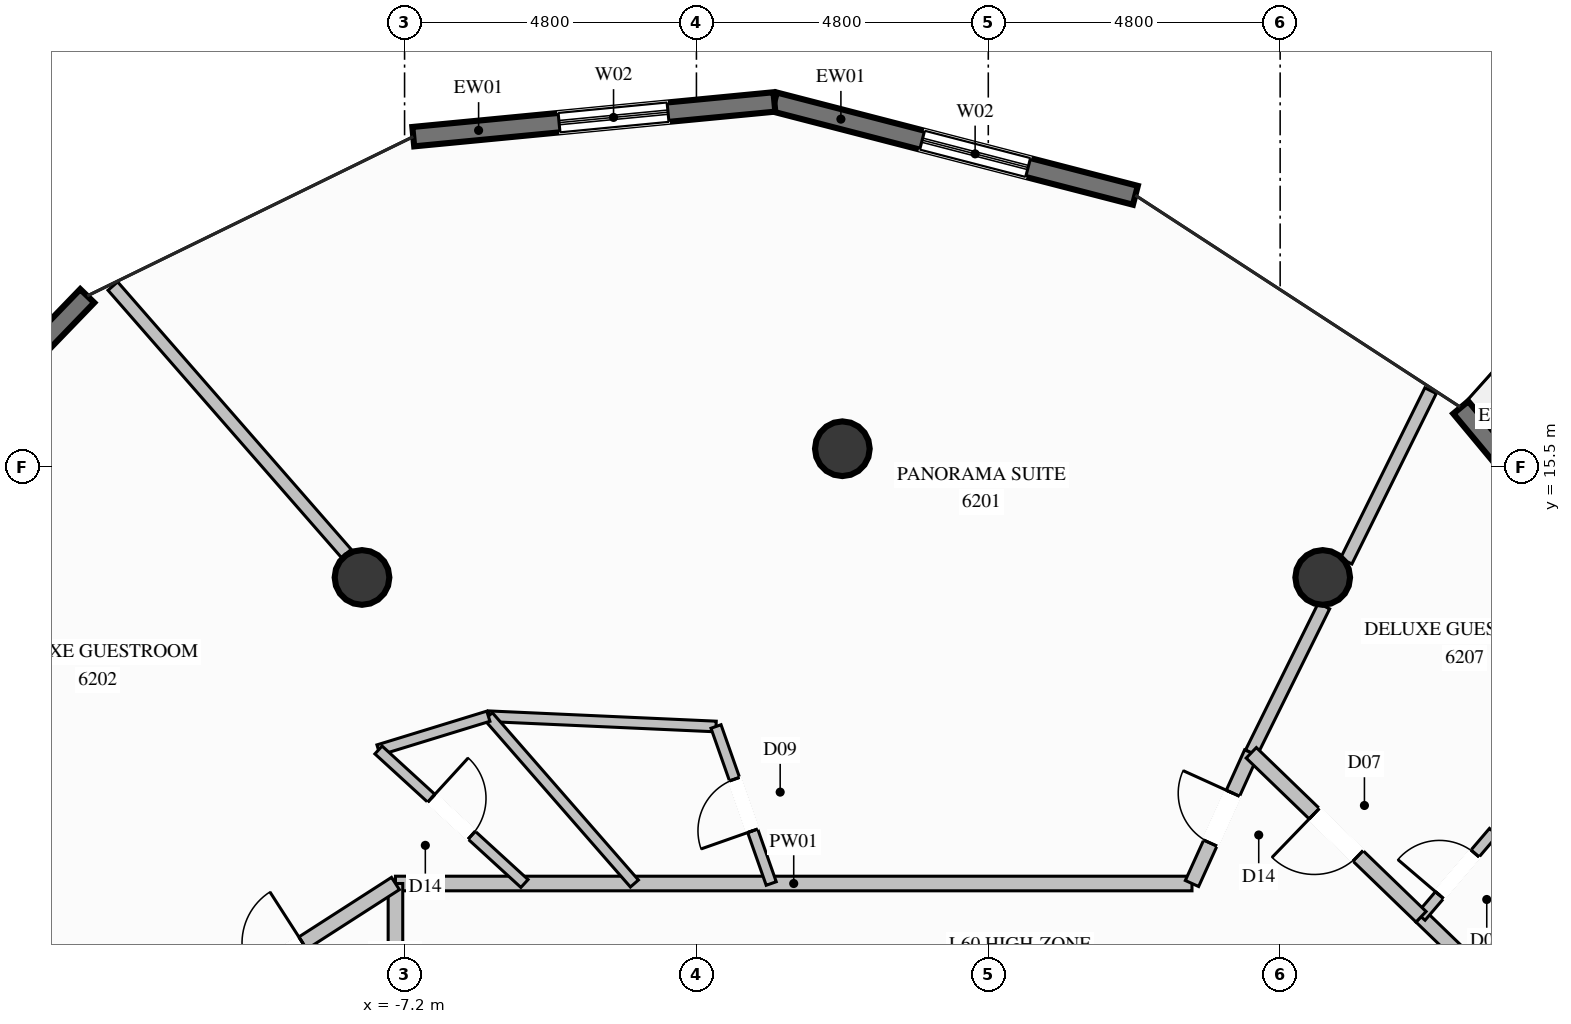
"""IFC4 building model, lengths in metres.
Left out: names, types, materials, properties, quantities, classifications, styles, units other than length and angle.
Written with IfcOpenShell. Run it as: python <this file> out.ifc"""

import sys

from ifc_helpers import new_model, si_unit, direction, frame, frame_2d, origin, origin_2d, place, context, subcontext, project, spatial, rectangle, circle, extrude, element, fill, save


model = new_model("IFC4")
c1 = context("Model", 3, precision=1e-05, world=origin(), true_north=direction((0.0, 1.0)))
c2 = subcontext(c1, "Body", "Model", "MODEL_VIEW")
j1 = project(units=[si_unit("LENGTHUNIT", "METRE"), si_unit("PLANEANGLEUNIT", "RADIAN")], contexts=[c1])
p1 = place(None, origin())
s1 = spatial("IfcSite", under=j1, at=p1, CompositionType="ELEMENT")
p2 = place(p1, origin())
s2 = spatial("IfcBuilding", under=s1, at=p2, CompositionType="ELEMENT")
p3 = place(p2, frame((0.0, 0.0, 230.8)))
s3 = spatial("IfcBuildingStorey", under=s2, at=p3, CompositionType="ELEMENT", Elevation=230.8)
for number, where, z_axis, x_axis in (
    (1, (7.9, 13.683, 0.0), (0.0, 0.0, 1.0), (1.0, 0.0, 0.0)),
    (2, (0.0, 15.8, 0.0), (0.0, 0.0, 1.0), (1.0, 0.0, 0.0)),
    (3, (-7.9, 13.683, 0.0), (0.0, 0.0, 1.0), (1.0, 0.0, 0.0)),
):
    element("IfcColumn", number, at=place(p3, frame(where, z_axis=z_axis, x_axis=x_axis)), inside=s3, PredefinedType="COLUMN", context=c2, shape_type="SweptSolid", body=[
        extrude(circle(Radius=0.45, at=origin_2d()), origin(), (0.0, 0.0, 1.0), 3.6),
    ])
p4 = place(p3, frame((10.171, 16.479, 0.0), z_axis=(0.0, 0.0, 1.0), x_axis=(0.639438786748, -0.76884201108, 0.0)))
e4 = element("IfcWall", 4, at=p4, inside=s3, PredefinedType="SOLIDWALL", context=c2, shape_type="SweptSolid", body=[
    extrude(rectangle(XDim=6.637, YDim=0.32, at=frame_2d((3.319, 0.0))), origin(), (0.0, 0.0, 1.0), 3.2),
])
p5 = place(p4, frame((2.419, 0.0, 0.35)))
e5 = element("IfcOpeningElement", 5, at=p5, cuts=e4, PredefinedType="OPENING", context=c2, shape_type="SweptSolid", body=[
    extrude(rectangle(XDim=1.8, YDim=2.6, at=frame_2d((0.9, 1.3))), frame((0.0, 0.17, 0.0), z_axis=(0.0, -1.0, 0.0), x_axis=(1.0, 0.0, 0.0)), (0.0, 0.0, 1.0), 0.34),
])
p6 = place(p3, frame((-1.118, 21.503, 0.0), z_axis=(0.0, 0.0, 1.0), x_axis=(0.968167541314, -0.250303040227, 0.0)))
e6 = element("IfcWall", 6, at=p6, inside=s3, PredefinedType="SOLIDWALL", context=c2, shape_type="SweptSolid", body=[
    extrude(rectangle(XDim=6.132, YDim=0.32, at=frame_2d((3.066, 0.0))), origin(), (0.0, 0.0, 1.0), 3.2),
])
p7 = place(p6, frame((2.51, 0.0, 0.35)))
e7 = element("IfcOpeningElement", 7, at=p7, cuts=e6, PredefinedType="OPENING", context=c2, shape_type="SweptSolid", body=[
    extrude(rectangle(XDim=1.8, YDim=2.6, at=frame_2d((0.9, 1.3))), frame((0.0, 0.17, 0.0), z_axis=(0.0, -1.0, 0.0), x_axis=(1.0, 0.0, 0.0)), (0.0, 0.0, 1.0), 0.34),
])
p8 = place(p3, frame((-7.057, 20.932, 0.0), z_axis=(0.0, 0.0, 1.0), x_axis=(0.995409179042, 0.095710847233, 0.0)))
e8 = element("IfcWall", 8, at=p8, inside=s3, PredefinedType="SOLIDWALL", context=c2, shape_type="SweptSolid", body=[
    extrude(rectangle(XDim=5.966, YDim=0.32, at=frame_2d((2.983, 0.0))), origin(), (0.0, 0.0, 1.0), 3.2),
])
p9 = place(p8, frame((2.409, 0.0, 0.35)))
e9 = element("IfcOpeningElement", 9, at=p9, cuts=e8, PredefinedType="OPENING", context=c2, shape_type="SweptSolid", body=[
    extrude(rectangle(XDim=1.8, YDim=2.6, at=frame_2d((0.9, 1.3))), frame((0.0, 0.17, 0.0), z_axis=(0.0, -1.0, 0.0), x_axis=(1.0, 0.0, 0.0)), (0.0, 0.0, 1.0), 0.34),
])
p10 = place(p3, frame((-16.677, 13.901, 0.0), z_axis=(0.0, 0.0, 1.0), x_axis=(0.694433198018, 0.71955717875, 0.0)))
e10 = element("IfcWall", 10, at=p10, inside=s3, PredefinedType="SOLIDWALL", context=c2, shape_type="SweptSolid", body=[
    extrude(rectangle(XDim=6.132, YDim=0.32, at=frame_2d((3.066, 0.0))), origin(), (0.0, 0.0, 1.0), 3.2),
])
p11 = place(p10, frame((2.166, 0.0, 0.35)))
e11 = element("IfcOpeningElement", 11, at=p11, cuts=e10, PredefinedType="OPENING", context=c2, shape_type="SweptSolid", body=[
    extrude(rectangle(XDim=1.8, YDim=2.6, at=frame_2d((0.9, 1.3))), frame((0.0, 0.17, 0.0), z_axis=(0.0, -1.0, 0.0), x_axis=(1.0, 0.0, 0.0)), (0.0, 0.0, 1.0), 0.34),
])
p12 = place(p3, frame((-7.35, 8.65, 0.0), z_axis=(0.0, 0.0, 1.0), x_axis=(1.0, 0.0, 0.0)))
e12 = element("IfcWall", 12, at=p12, inside=s3, PredefinedType="PARTITIONING", context=c2, shape_type="SweptSolid", body=[
    extrude(rectangle(XDim=13.1, YDim=0.24, at=frame_2d((6.55, 0.0))), origin(), (0.0, 0.0, 1.0), 3.2),
])
p13 = place(p3, frame((-7.35, 4.95, 0.0), z_axis=(0.0, 0.0, 1.0), x_axis=(0.0, 1.0, 0.0)))
e13 = element("IfcWall", 13, at=p13, inside=s3, PredefinedType="PARTITIONING", context=c2, shape_type="SweptSolid", body=[
    extrude(rectangle(XDim=3.7, YDim=0.24, at=frame_2d((1.85, 0.0))), origin(), (0.0, 0.0, 1.0), 3.2),
])
p14 = place(p3, frame((6.725, 10.799, 0.0), z_axis=(0.0, 0.0, 1.0), x_axis=(0.443620421332, 0.896214774358, 0.0)))
e14 = element("IfcWall", 14, at=p14, inside=s3, PredefinedType="PARTITIONING", context=c2, shape_type="SweptSolid", body=[
    extrude(rectangle(XDim=2.693, YDim=0.21, at=frame_2d((1.347, 0.0))), origin(), (0.0, 0.0, 1.0), 2.067),
])
p15 = place(p3, frame((8.286, 13.951, 0.0), z_axis=(0.0, 0.0, 1.0), x_axis=(0.443683126351, 0.896183733054, 0.0)))
e15 = element("IfcWall", 15, at=p15, inside=s3, PredefinedType="PARTITIONING", context=c2, shape_type="SweptSolid", body=[
    extrude(rectangle(XDim=3.129, YDim=0.21, at=frame_2d((1.564, 0.0))), origin(), (0.0, 0.0, 1.0), 3.2),
])
p16 = place(p3, frame((-5.822, 11.401, 0.0), z_axis=(0.0, 0.0, 1.0), x_axis=(0.99898352798, -0.045076721529, 0.0)))
e16 = element("IfcWall", 16, at=p16, inside=s3, PredefinedType="PLUMBINGWALL", context=c2, shape_type="SweptSolid", body=[
    extrude(rectangle(XDim=3.748, YDim=0.175, at=frame_2d((1.874, 0.0))), origin(), (0.0, 0.0, 1.0), 3.2),
])
p17 = place(p3, frame((-5.822, 11.401, 0.0), z_axis=(0.0, 0.0, 1.0), x_axis=(0.657728098428, -0.753255433793, 0.0)))
e17 = element("IfcWall", 17, at=p17, inside=s3, PredefinedType="PLUMBINGWALL", context=c2, shape_type="SweptSolid", body=[
    extrude(rectangle(XDim=3.652, YDim=0.175, at=frame_2d((1.826, 0.0))), origin(), (0.0, 0.0, 1.0), 2.067),
])
p18 = place(p3, frame((-1.17, 8.65, 0.0), z_axis=(0.0, 0.0, 1.0), x_axis=(-0.33173276109, 0.943373401798, 0.0)))
e18 = element("IfcWall", 18, at=p18, inside=s3, PredefinedType="PLUMBINGWALL", context=c2, shape_type="SweptSolid", body=[
    extrude(rectangle(XDim=2.737, YDim=0.175, at=frame_2d((1.369, 0.0))), origin(), (0.0, 0.0, 1.0), 3.2),
])
p19 = place(p18, frame((0.919, 0.0, 0.0)))
e19 = element("IfcOpeningElement", 19, at=p19, cuts=e18, PredefinedType="OPENING", context=c2, shape_type="SweptSolid", body=[
    extrude(rectangle(XDim=0.9, YDim=2.1, at=frame_2d((0.45, 1.05))), frame((0.0, 0.098, 0.0), z_axis=(0.0, -1.0, 0.0), x_axis=(1.0, 0.0, 0.0)), (0.0, 0.0, 1.0), 0.195),
])
p20 = place(p3, frame((-8.157, 14.076, 0.0), z_axis=(0.0, 0.0, 1.0), x_axis=(-0.657708106677, 0.753272889736, 0.0)))
e20 = element("IfcWall", 20, at=p20, inside=s3, PredefinedType="PARTITIONING", context=c2, shape_type="SweptSolid", body=[
    extrude(rectangle(XDim=5.84, YDim=0.21, at=frame_2d((2.92, 0.0))), origin(), (0.0, 0.0, 1.0), 3.2),
])
p21 = place(p3, frame((5.75, 8.65, 0.0), z_axis=(0.0, 0.0, 1.0), x_axis=(0.413171528251, 0.910653220629, 0.0)))
e21 = element("IfcWall", 21, at=p21, inside=s3, PredefinedType="PARTITIONING", context=c2, shape_type="SweptSolid", body=[
    extrude(rectangle(XDim=2.36, YDim=0.24, at=frame_2d((1.18, 0.0))), origin(), (0.0, 0.0, 1.0), 2.067),
])
p22 = place(p21, frame((0.73, 0.0, 0.0)))
e22 = element("IfcOpeningElement", 22, at=p22, cuts=e21, PredefinedType="OPENING", context=c2, shape_type="SweptSolid", body=[
    extrude(rectangle(XDim=0.9, YDim=2.02, at=frame_2d((0.45, 1.01))), frame((0.0, 0.13, 0.0), z_axis=(0.0, -1.0, 0.0), x_axis=(1.0, 0.0, 0.0)), (0.0, 0.0, 1.0), 0.26),
])
p23 = place(p3, frame((-7.629, 10.846, 0.0), z_axis=(0.0, 0.0, 1.0), x_axis=(0.955932477138, 0.293586612692, 0.0)))
e23 = element("IfcWall", 23, at=p23, inside=s3, PredefinedType="PLUMBINGWALL", context=c2, shape_type="SweptSolid", body=[
    extrude(rectangle(XDim=1.89, YDim=0.175, at=frame_2d((0.945, 0.0))), origin(), (0.0, 0.0, 1.0), 3.2),
])
p24 = place(p3, frame((-7.629, 10.846, 0.0), z_axis=(0.0, 0.0, 1.0), x_axis=(0.737882530439, -0.674929160189, 0.0)))
e24 = element("IfcWall", 24, at=p24, inside=s3, PredefinedType="PLUMBINGWALL", context=c2, shape_type="SweptSolid", body=[
    extrude(rectangle(XDim=3.254, YDim=0.175, at=frame_2d((1.627, 0.0))), origin(), (0.0, 0.0, 1.0), 2.067),
])
p25 = place(p24, frame((1.177, 0.0, 0.0)))
e25 = element("IfcOpeningElement", 25, at=p25, cuts=e24, PredefinedType="OPENING", context=c2, shape_type="SweptSolid", body=[
    extrude(rectangle(XDim=0.9, YDim=2.02, at=frame_2d((0.45, 1.01))), frame((0.0, 0.098, 0.0), z_axis=(0.0, -1.0, 0.0), x_axis=(1.0, 0.0, 0.0)), (0.0, 0.0, 1.0), 0.195),
])
p26 = place(p3, frame((-11.238, 6.15, 0.0), z_axis=(0.0, 0.0, 1.0), x_axis=(0.841118406986, 0.540851019625, 0.0)))
e26 = element("IfcWall", 26, at=p26, inside=s3, PredefinedType="PARTITIONING", context=c2, shape_type="SweptSolid", body=[
    extrude(rectangle(XDim=4.622, YDim=0.24, at=frame_2d((2.311, 0.0))), origin(), (0.0, 0.0, 1.0), 3.2),
])
p27 = place(p26, frame((1.811, 0.0, 0.0)))
e27 = element("IfcOpeningElement", 27, at=p27, cuts=e26, PredefinedType="OPENING", context=c2, shape_type="SweptSolid", body=[
    extrude(rectangle(XDim=1.0, YDim=2.2, at=frame_2d((0.5, 1.1))), frame((0.0, 0.13, 0.0), z_axis=(0.0, -1.0, 0.0), x_axis=(1.0, 0.0, 0.0)), (0.0, 0.0, 1.0), 0.26),
])
p28 = place(p3, frame((11.538, 6.15, 0.0), z_axis=(0.0, 0.0, 1.0), x_axis=(-0.719078080202, 0.694929287463, 0.0)))
e28 = element("IfcWall", 28, at=p28, inside=s3, PredefinedType="PARTITIONING", context=c2, shape_type="SweptSolid", body=[
    extrude(rectangle(XDim=2.811, YDim=0.24, at=frame_2d((1.405, 0.0))), origin(), (0.0, 0.0, 1.0), 3.2),
])
p29 = place(p3, frame((12.867, 7.091, 0.0), z_axis=(0.0, 0.0, 1.0), x_axis=(-0.667390556652, 0.744707892325, 0.0)))
e29 = element("IfcWall", 29, at=p29, inside=s3, PredefinedType="PLUMBINGWALL", context=c2, shape_type="SweptSolid", body=[
    extrude(rectangle(XDim=3.233, YDim=0.175, at=frame_2d((1.617, 0.0))), origin(), (0.0, 0.0, 1.0), 3.2),
])
p30 = place(p3, frame((9.517, 8.103, 0.0), z_axis=(0.0, 0.0, 1.0), x_axis=(0.649322426224, 0.760513239071, 0.0)))
e30 = element("IfcWall", 30, at=p30, inside=s3, PredefinedType="PLUMBINGWALL", context=c2, shape_type="SweptSolid", body=[
    extrude(rectangle(XDim=1.836, YDim=0.175, at=frame_2d((0.918, 0.0))), origin(), (0.0, 0.0, 1.0), 3.2),
])
p31 = place(p30, frame((0.468, 0.0, 0.0)))
e31 = element("IfcOpeningElement", 31, at=p31, cuts=e30, PredefinedType="OPENING", context=c2, shape_type="SweptSolid", body=[
    extrude(rectangle(XDim=0.9, YDim=2.1, at=frame_2d((0.45, 1.05))), frame((0.0, 0.098, 0.0), z_axis=(0.0, -1.0, 0.0), x_axis=(1.0, 0.0, 0.0)), (0.0, 0.0, 1.0), 0.195),
])
p32 = place(p3, frame((9.517, 8.103, 0.0), z_axis=(0.0, 0.0, 1.0), x_axis=(-0.719359188441, 0.694638292931, 0.0)))
e32 = element("IfcWall", 32, at=p32, inside=s3, PredefinedType="PARTITIONING", context=c2, shape_type="SweptSolid", body=[
    extrude(rectangle(XDim=3.881, YDim=0.24, at=frame_2d((1.94, 0.0))), origin(), (0.0, 0.0, 1.0), 3.2),
])
p33 = place(p32, frame((1.441, 0.0, 0.0)))
e33 = element("IfcOpeningElement", 33, at=p33, cuts=e32, PredefinedType="OPENING", context=c2, shape_type="SweptSolid", body=[
    extrude(rectangle(XDim=1.0, YDim=2.2, at=frame_2d((0.5, 1.1))), frame((0.0, 0.13, 0.0), z_axis=(0.0, -1.0, 0.0), x_axis=(1.0, 0.0, 0.0)), (0.0, 0.0, 1.0), 0.26),
])
p34 = place(p7, origin())
e34 = element("IfcWindow", 34, at=p34, inside=s3, PartitioningType="SINGLE_PANEL", PredefinedType="WINDOW", context=c2, shape_type="SweptSolid", body=[
    extrude(rectangle(XDim=1.8, YDim=2.6, at=frame_2d((0.9, 1.3))), frame((0.0, 0.03, 0.0), z_axis=(0.0, -1.0, 0.0), x_axis=(1.0, 0.0, 0.0)), (0.0, 0.0, 1.0), 0.06),
])
fill(e7, e34)
p35 = place(p9, origin())
e35 = element("IfcWindow", 35, at=p35, inside=s3, PartitioningType="SINGLE_PANEL", PredefinedType="WINDOW", context=c2, shape_type="SweptSolid", body=[
    extrude(rectangle(XDim=1.8, YDim=2.6, at=frame_2d((0.9, 1.3))), frame((0.0, 0.03, 0.0), z_axis=(0.0, -1.0, 0.0), x_axis=(1.0, 0.0, 0.0)), (0.0, 0.0, 1.0), 0.06),
])
fill(e9, e35)
p36 = place(p19, origin())
e36 = element("IfcDoor", 36, at=p36, inside=s3, OperationType="SINGLE_SWING_LEFT", PredefinedType="DOOR", context=c2, shape_type="SweptSolid", body=[
    extrude(rectangle(XDim=0.9, YDim=2.1, at=frame_2d((0.45, 1.05))), frame((0.0, 0.025, 0.0), z_axis=(0.0, -1.0, 0.0), x_axis=(1.0, 0.0, 0.0)), (0.0, 0.0, 1.0), 0.05),
])
fill(e19, e36)
p37 = place(p22, origin())
e37 = element("IfcDoor", 37, at=p37, inside=s3, OperationType="SINGLE_SWING_RIGHT", PredefinedType="DOOR", context=c2, shape_type="SweptSolid", body=[
    extrude(rectangle(XDim=0.9, YDim=2.02, at=frame_2d((0.45, 1.01))), frame((0.0, 0.025, 0.0), z_axis=(0.0, -1.0, 0.0), x_axis=(1.0, 0.0, 0.0)), (0.0, 0.0, 1.0), 0.05),
])
fill(e22, e37)
p38 = place(p25, origin())
e38 = element("IfcDoor", 38, at=p38, inside=s3, OperationType="SINGLE_SWING_LEFT", PredefinedType="DOOR", context=c2, shape_type="SweptSolid", body=[
    extrude(rectangle(XDim=0.9, YDim=2.02, at=frame_2d((0.45, 1.01))), frame((0.0, 0.025, 0.0), z_axis=(0.0, -1.0, 0.0), x_axis=(1.0, 0.0, 0.0)), (0.0, 0.0, 1.0), 0.05),
])
fill(e25, e38)
p39 = place(p27, origin())
e39 = element("IfcDoor", 39, at=p39, inside=s3, OperationType="SINGLE_SWING_RIGHT", PredefinedType="DOOR", context=c2, shape_type="SweptSolid", body=[
    extrude(rectangle(XDim=1.0, YDim=2.2, at=frame_2d((0.5, 1.1))), frame((0.0, 0.025, 0.0), z_axis=(0.0, -1.0, 0.0), x_axis=(1.0, 0.0, 0.0)), (0.0, 0.0, 1.0), 0.05),
])
fill(e27, e39)
p40 = place(p31, origin())
e40 = element("IfcDoor", 40, at=p40, inside=s3, OperationType="SINGLE_SWING_LEFT", PredefinedType="DOOR", context=c2, shape_type="SweptSolid", body=[
    extrude(rectangle(XDim=0.9, YDim=2.1, at=frame_2d((0.45, 1.05))), frame((0.0, 0.025, 0.0), z_axis=(0.0, -1.0, 0.0), x_axis=(1.0, 0.0, 0.0)), (0.0, 0.0, 1.0), 0.05),
])
fill(e31, e40)
p41 = place(p33, origin())
e41 = element("IfcDoor", 41, at=p41, inside=s3, OperationType="SINGLE_SWING_RIGHT", PredefinedType="DOOR", context=c2, shape_type="SweptSolid", body=[
    extrude(rectangle(XDim=1.0, YDim=2.2, at=frame_2d((0.5, 1.1))), frame((0.0, 0.025, 0.0), z_axis=(0.0, -1.0, 0.0), x_axis=(1.0, 0.0, 0.0)), (0.0, 0.0, 1.0), 0.05),
])
fill(e33, e41)
save(model, sys.argv[1])
